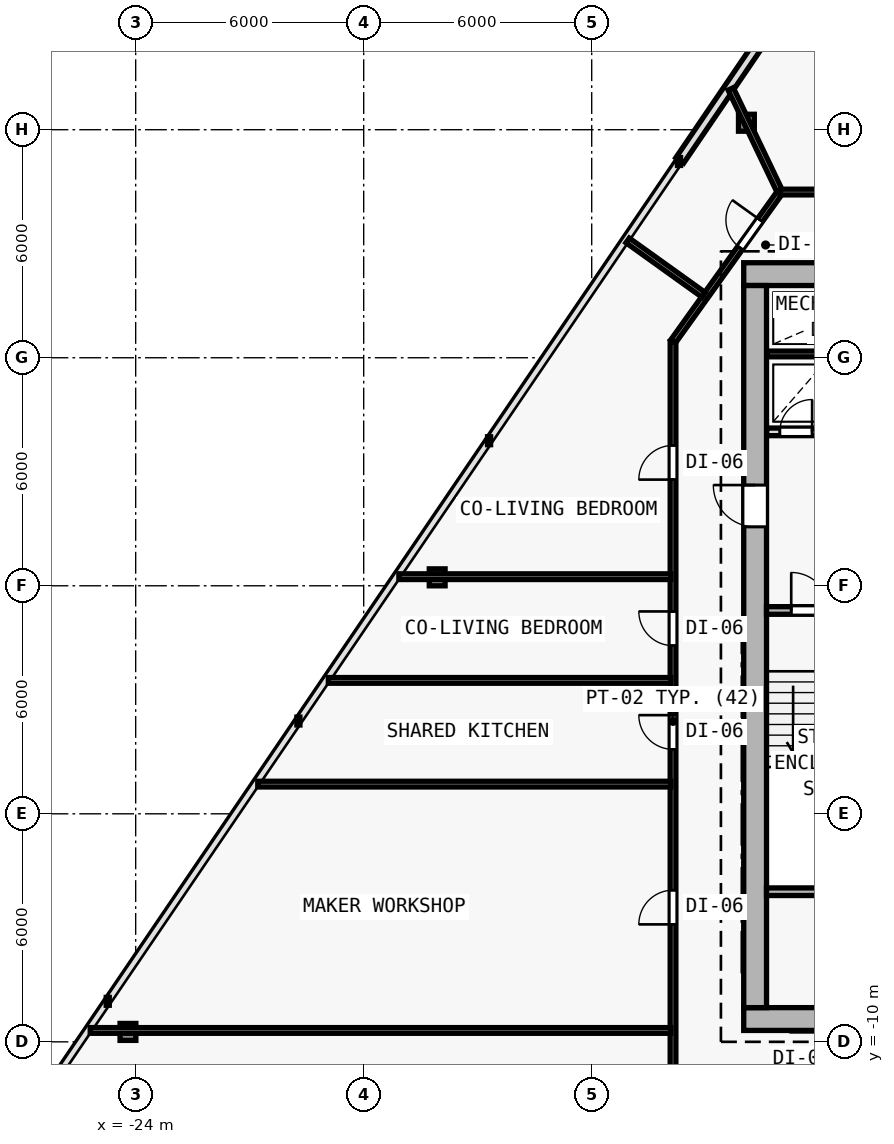
"""IFC4 building model, lengths in metres.
Left out: names, types, materials, properties, quantities, classifications, styles, units other than length and angle.
Written with IfcOpenShell. Run it as: python <this file> out.ifc"""

import sys

from ifc_helpers import new_model, si_unit, direction, frame, frame_2d, origin, origin_2d, place, context, subcontext, project, spatial, rectangle, i_section, extrude, element, fill, save


model = new_model("IFC4")
c1 = context("Model", 3, precision=1e-05, world=origin(), true_north=direction((0.0, 1.0)))
c2 = subcontext(c1, "Body", "Model", "MODEL_VIEW")
j1 = project(units=[si_unit("LENGTHUNIT", "METRE"), si_unit("PLANEANGLEUNIT", "RADIAN")], contexts=[c1])
p1 = place(None, origin())
s1 = spatial("IfcSite", under=j1, at=p1, CompositionType="ELEMENT")
p2 = place(p1, origin())
s2 = spatial("IfcBuilding", under=s1, at=p2, CompositionType="ELEMENT")
p3 = place(p2, frame((0.0, 0.0, 33.6)))
s3 = spatial("IfcBuildingStorey", under=s2, at=p3, CompositionType="ELEMENT", Elevation=33.6)
for number, where, z_axis, x_axis in (
    (1, (-7.7, -9.4, 0.0), (0.0, 0.0, 1.0), (1.0, 0.0, 0.0)),
    (2, (-7.7, 10.2, 0.0), (0.0, 0.0, 1.0), (1.0, 0.0, 0.0)),
    (3, (-7.7, 2.0, 0.0), (0.0, 0.0, 1.0), (1.0, 0.0, 0.0)),
):
    element("IfcColumn", number, at=place(p3, frame(where, z_axis=z_axis, x_axis=x_axis)), inside=s3, PredefinedType="COLUMN", context=c2, shape_type="SweptSolid", body=[
        extrude(i_section(OverallWidth=0.416, OverallDepth=0.446, WebThickness=0.025, FlangeThickness=0.04, FilletRadius=0.015, at=origin_2d()), origin(), (0.0, 0.0, 1.0), 3.6),
    ])
p4 = place(p3, frame((-7.929, 14.183, 0.005), z_axis=(0.008774547672, -0.002516730728, 0.999958335822), x_axis=(0.275705143097, 0.961242255662, 0.0)))
e4 = element("IfcColumn", 4, at=p4, inside=s3, PredefinedType="COLUMN", context=c2, shape_type="SweptSolid", body=[
    extrude(i_section(OverallWidth=0.416, OverallDepth=0.446, WebThickness=0.025, FlangeThickness=0.04, FilletRadius=0.015, at=origin_2d()), origin(), (0.0, 0.0, 1.0), 3.589),
])
p5 = place(p3, frame((-16.066, 2.222, 0.005), z_axis=(0.017070406608, 0.009521342331, 0.99980895438), x_axis=(-0.487119351792, 0.873335409284, 0.0)))
e5 = element("IfcColumn", 5, at=p5, inside=s3, PredefinedType="COLUMN", context=c2, shape_type="SweptSolid", body=[
    extrude(i_section(OverallWidth=0.416, OverallDepth=0.446, WebThickness=0.025, FlangeThickness=0.04, FilletRadius=0.015, at=origin_2d()), origin(), (0.0, 0.0, 1.0), 3.59),
])
p6 = place(p3, frame((-24.203, -9.739, 0.005), z_axis=(0.025222486673, 0.021551289152, 0.999449532544), x_axis=(-0.649609258817, 0.760268249278, 0.0)))
e6 = element("IfcColumn", 6, at=p6, inside=s3, PredefinedType="COLUMN", context=c2, shape_type="SweptSolid", body=[
    extrude(i_section(OverallWidth=0.416, OverallDepth=0.446, WebThickness=0.025, FlangeThickness=0.04, FilletRadius=0.015, at=origin_2d()), origin(), (0.0, 0.0, 1.0), 3.591),
])
p7 = place(p3, frame((-9.684, 13.191, 0.0), z_axis=(0.0, 0.0, 1.0), x_axis=(0.562473549685, 0.826815279192, 0.0)))
e7 = element("IfcWall", 7, at=p7, inside=s3, PredefinedType="SOLIDWALL", context=c2, shape_type="SweptSolid", body=[
    extrude(rectangle(XDim=12.536, YDim=0.25, at=frame_2d((6.268, 0.0))), origin(), (0.0, 0.0, 1.0), 3.35),
])
p8 = place(p7, frame((5.568, 0.0, 0.62)))
e8 = element("IfcOpeningElement", 8, at=p8, cuts=e7, PredefinedType="OPENING", context=c2, shape_type="SweptSolid", body=[
    extrude(rectangle(XDim=1.4, YDim=2.0, at=frame_2d((0.7, 1.0))), frame((0.0, 0.135, 0.0), z_axis=(0.0, -1.0, 0.0), x_axis=(1.0, 0.0, 0.0)), (0.0, 0.0, 1.0), 0.27),
])
p9 = place(p3, frame((-8.0, -9.4, 0.0), z_axis=(0.0, 0.0, 1.0), x_axis=(1.0, 0.0, 0.0)))
e9 = element("IfcWall", 9, at=p9, inside=s3, PredefinedType="SHEAR", context=c2, shape_type="SweptSolid", body=[
    extrude(rectangle(XDim=16.0, YDim=0.6, at=frame_2d((8.0, 0.0))), origin(), (0.0, 0.0, 1.0), 3.35),
])
p10 = place(p9, frame((9.65, 0.0, 0.0)))
e10 = element("IfcOpeningElement", 10, at=p10, cuts=e9, PredefinedType="OPENING", context=c2, shape_type="SweptSolid", body=[
    extrude(rectangle(XDim=1.5, YDim=2.2, at=frame_2d((0.75, 1.1))), frame((0.0, 0.31, 0.0), z_axis=(0.0, -1.0, 0.0), x_axis=(1.0, 0.0, 0.0)), (0.0, 0.0, 1.0), 0.62),
])
p11 = place(p3, frame((8.0, 10.2, 0.0), z_axis=(0.0, 0.0, 1.0), x_axis=(-1.0, 0.0, 0.0)))
e11 = element("IfcWall", 11, at=p11, inside=s3, PredefinedType="SHEAR", context=c2, shape_type="SweptSolid", body=[
    extrude(rectangle(XDim=16.0, YDim=0.6, at=frame_2d((8.0, 0.0))), origin(), (0.0, 0.0, 1.0), 3.35),
])
p12 = place(p11, frame((4.45, 0.0, 0.0)))
e12 = element("IfcOpeningElement", 12, at=p12, cuts=e11, PredefinedType="OPENING", context=c2, shape_type="SweptSolid", body=[
    extrude(rectangle(XDim=1.1, YDim=2.15, at=frame_2d((0.55, 1.075))), frame((0.0, 0.31, 0.0), z_axis=(0.0, -1.0, 0.0), x_axis=(1.0, 0.0, 0.0)), (0.0, 0.0, 1.0), 0.62),
])
p13 = place(p3, frame((-7.7, -9.1, 0.0), z_axis=(0.0, 0.0, 1.0), x_axis=(0.0, 1.0, 0.0)))
e13 = element("IfcWall", 13, at=p13, inside=s3, PredefinedType="SHEAR", context=c2, shape_type="SweptSolid", body=[
    extrude(rectangle(XDim=19.0, YDim=0.6, at=frame_2d((9.5, 0.0))), origin(), (0.0, 0.0, 1.0), 3.35),
])
p14 = place(p13, frame((12.65, 0.0, 0.0)))
e14 = element("IfcOpeningElement", 14, at=p14, cuts=e13, PredefinedType="OPENING", context=c2, shape_type="SweptSolid", body=[
    extrude(rectangle(XDim=1.1, YDim=2.15, at=frame_2d((0.55, 1.075))), frame((0.0, 0.31, 0.0), z_axis=(0.0, -1.0, 0.0), x_axis=(1.0, 0.0, 0.0)), (0.0, 0.0, 1.0), 0.62),
])
p15 = place(p3, frame((-7.4, 1.35, 0.0), z_axis=(0.0, 0.0, 1.0), x_axis=(1.0, 0.0, 0.0)))
e15 = element("IfcWall", 15, at=p15, inside=s3, PredefinedType="SOLIDWALL", context=c2, shape_type="SweptSolid", body=[
    extrude(rectangle(XDim=3.35, YDim=0.2, at=frame_2d((1.675, 0.0))), origin(), (0.0, 0.0, 1.0), 3.35),
])
p16 = place(p15, frame((0.65, 0.0, 0.0)))
e16 = element("IfcOpeningElement", 16, at=p16, cuts=e15, PredefinedType="OPENING", context=c2, shape_type="SweptSolid", body=[
    extrude(rectangle(XDim=1.0, YDim=2.15, at=frame_2d((0.5, 1.075))), frame((0.0, 0.11, 0.0), z_axis=(0.0, -1.0, 0.0), x_axis=(1.0, 0.0, 0.0)), (0.0, 0.0, 1.0), 0.22),
])
p17 = place(p3, frame((-7.395, 6.05, 0.0), z_axis=(0.0, 0.0, 1.0), x_axis=(1.0, 0.0, 0.0)))
e17 = element("IfcWall", 17, at=p17, inside=s3, PredefinedType="SOLIDWALL", context=c2, shape_type="SweptSolid", body=[
    extrude(rectangle(XDim=3.545, YDim=0.2, at=frame_2d((1.772, 0.0))), origin(), (0.0, 0.0, 1.0), 3.35),
])
p18 = place(p17, frame((0.345, 0.0, 0.0)))
e18 = element("IfcOpeningElement", 18, at=p18, cuts=e17, PredefinedType="OPENING", context=c2, shape_type="SweptSolid", body=[
    extrude(rectangle(XDim=0.85, YDim=2.1, at=frame_2d((0.425, 1.05))), frame((0.0, 0.11, 0.0), z_axis=(0.0, -1.0, 0.0), x_axis=(1.0, 0.0, 0.0)), (0.0, 0.0, 1.0), 0.22),
])
p19 = place(p17, frame((2.145, 0.0, 0.0)))
e19 = element("IfcOpeningElement", 19, at=p19, cuts=e17, PredefinedType="OPENING", context=c2, shape_type="SweptSolid", body=[
    extrude(rectangle(XDim=0.85, YDim=2.1, at=frame_2d((0.425, 1.05))), frame((0.0, 0.11, 0.0), z_axis=(0.0, -1.0, 0.0), x_axis=(1.0, 0.0, 0.0)), (0.0, 0.0, 1.0), 0.22),
])
p20 = place(p3, frame((-7.395, 8.1, 0.0), z_axis=(0.0, 0.0, 1.0), x_axis=(1.0, 0.0, 0.0)))
e20 = element("IfcWall", 20, at=p20, inside=s3, PredefinedType="PARTITIONING", context=c2, shape_type="SweptSolid", body=[
    extrude(rectangle(XDim=3.545, YDim=0.15, at=frame_2d((1.772, 0.0))), origin(), (0.0, 0.0, 1.0), 3.35),
])
p21 = place(p3, frame((-7.4, -6.05, 0.0), z_axis=(0.0, 0.0, 1.0), x_axis=(1.0, 0.0, 0.0)))
e21 = element("IfcWall", 21, at=p21, inside=s3, PredefinedType="SOLIDWALL", context=c2, shape_type="SweptSolid", body=[
    extrude(rectangle(XDim=3.35, YDim=0.2, at=frame_2d((1.675, 0.0))), origin(), (0.0, 0.0, 1.0), 3.35),
])
p22 = place(p3, frame((-9.86, -11.56, 0.0), z_axis=(0.0, 0.0, 1.0), x_axis=(0.0, 1.0, 0.0)))
e22 = element("IfcWall", 22, at=p22, inside=s3, PredefinedType="PARTITIONING", context=c2, shape_type="SweptSolid", body=[
    extrude(rectangle(XDim=19.986, YDim=0.15, at=frame_2d((9.993, 0.0))), origin(), (0.0, 0.0, 1.0), 2.609),
])
p23 = place(p22, frame((9.256, 0.0, 0.0)))
e23 = element("IfcOpeningElement", 23, at=p23, cuts=e22, PredefinedType="OPENING", context=c2, shape_type="SweptSolid", body=[
    extrude(rectangle(XDim=0.9, YDim=2.1, at=frame_2d((0.45, 1.05))), frame((0.0, 0.085, 0.0), z_axis=(0.0, -1.0, 0.0), x_axis=(1.0, 0.0, 0.0)), (0.0, 0.0, 1.0), 0.17),
])
p24 = place(p22, frame((4.65, 0.0, 0.0)))
e24 = element("IfcOpeningElement", 24, at=p24, cuts=e22, PredefinedType="OPENING", context=c2, shape_type="SweptSolid", body=[
    extrude(rectangle(XDim=0.9, YDim=2.1, at=frame_2d((0.45, 1.05))), frame((0.0, 0.085, 0.0), z_axis=(0.0, -1.0, 0.0), x_axis=(1.0, 0.0, 0.0)), (0.0, 0.0, 1.0), 0.17),
])
p25 = place(p22, frame((16.354, 0.0, 0.0)))
e25 = element("IfcOpeningElement", 25, at=p25, cuts=e22, PredefinedType="OPENING", context=c2, shape_type="SweptSolid", body=[
    extrude(rectangle(XDim=0.9, YDim=2.1, at=frame_2d((0.45, 1.05))), frame((0.0, 0.085, 0.0), z_axis=(0.0, -1.0, 0.0), x_axis=(1.0, 0.0, 0.0)), (0.0, 0.0, 1.0), 0.17),
])
p26 = place(p22, frame((11.985, 0.0, 0.0)))
e26 = element("IfcOpeningElement", 26, at=p26, cuts=e22, PredefinedType="OPENING", context=c2, shape_type="SweptSolid", body=[
    extrude(rectangle(XDim=0.9, YDim=2.1, at=frame_2d((0.45, 1.05))), frame((0.0, 0.085, 0.0), z_axis=(0.0, -1.0, 0.0), x_axis=(1.0, 0.0, 0.0)), (0.0, 0.0, 1.0), 0.17),
])
p27 = place(p3, frame((-9.86, 8.426, 0.0), z_axis=(0.0, 0.0, 1.0), x_axis=(0.582449511476, 0.812866881218, 0.0)))
e27 = element("IfcWall", 27, at=p27, inside=s3, PredefinedType="PARTITIONING", context=c2, shape_type="SweptSolid", body=[
    extrude(rectangle(XDim=4.84, YDim=0.15, at=frame_2d((2.42, 0.0))), origin(), (0.0, 0.0, 1.0), 2.725),
])
p28 = place(p27, frame((3.035, 0.0, 0.0)))
e28 = element("IfcOpeningElement", 28, at=p28, cuts=e27, PredefinedType="OPENING", context=c2, shape_type="SweptSolid", body=[
    extrude(rectangle(XDim=0.9, YDim=2.1, at=frame_2d((0.45, 1.05))), frame((0.0, 0.085, 0.0), z_axis=(0.0, -1.0, 0.0), x_axis=(1.0, 0.0, 0.0)), (0.0, 0.0, 1.0), 0.17),
])
p29 = place(p3, frame((-7.041, 12.36, 0.0), z_axis=(0.0, 0.0, 1.0), x_axis=(1.0, 0.0, 0.0)))
e29 = element("IfcWall", 29, at=p29, inside=s3, PredefinedType="PARTITIONING", context=c2, shape_type="SweptSolid", body=[
    extrude(rectangle(XDim=14.082, YDim=0.15, at=frame_2d((7.041, 0.0))), origin(), (0.0, 0.0, 1.0), 3.35),
])
p30 = place(p29, frame((10.257, 0.0, 0.0)))
e30 = element("IfcOpeningElement", 30, at=p30, cuts=e29, PredefinedType="OPENING", context=c2, shape_type="SweptSolid", body=[
    extrude(rectangle(XDim=0.9, YDim=2.1, at=frame_2d((0.45, 1.05))), frame((0.0, 0.085, 0.0), z_axis=(0.0, -1.0, 0.0), x_axis=(1.0, 0.0, 0.0)), (0.0, 0.0, 1.0), 0.17),
])
p31 = place(p29, frame((3.394, 0.0, 0.0)))
e31 = element("IfcOpeningElement", 31, at=p31, cuts=e29, PredefinedType="OPENING", context=c2, shape_type="SweptSolid", body=[
    extrude(rectangle(XDim=0.9, YDim=2.1, at=frame_2d((0.45, 1.05))), frame((0.0, 0.085, 0.0), z_axis=(0.0, -1.0, 0.0), x_axis=(1.0, 0.0, 0.0)), (0.0, 0.0, 1.0), 0.17),
])
p32 = place(p3, frame((-7.064, 12.404, 0.0), z_axis=(0.0, 0.0, 1.0), x_axis=(-0.431808559167, 0.901965281056, 0.0)))
e32 = element("IfcWall", 32, at=p32, inside=s3, PredefinedType="PARTITIONING", context=c2, shape_type="SweptSolid", body=[
    extrude(rectangle(XDim=2.96, YDim=0.15, at=frame_2d((1.48, 0.0))), origin(), (0.0, 0.0, 1.0), 2.725),
])
p33 = place(p3, frame((-9.92, 2.239, 0.0), z_axis=(0.0, 0.0, 1.0), x_axis=(-1.0, 0.0, 0.0)))
e33 = element("IfcWall", 33, at=p33, inside=s3, PredefinedType="PARTITIONING", context=c2, shape_type="SweptSolid", body=[
    extrude(rectangle(XDim=7.154, YDim=0.15, at=frame_2d((3.577, 0.0))), origin(), (0.0, 0.0, 1.0), 2.725),
])
p34 = place(p3, frame((-9.92, -9.7, 0.0), z_axis=(0.0, 0.0, 1.0), x_axis=(-1.0, 0.0, 0.0)))
e34 = element("IfcWall", 34, at=p34, inside=s3, PredefinedType="PARTITIONING", context=c2, shape_type="SweptSolid", body=[
    extrude(rectangle(XDim=15.276, YDim=0.15, at=frame_2d((7.638, 0.0))), origin(), (0.0, 0.0, 1.0), 2.609),
])
p35 = place(p3, frame((-9.92, -3.219, 0.0), z_axis=(0.0, 0.0, 1.0), x_axis=(-1.0, 0.0, 0.0)))
e35 = element("IfcWall", 35, at=p35, inside=s3, PredefinedType="PARTITIONING", context=c2, shape_type="SweptSolid", body=[
    extrude(rectangle(XDim=10.867, YDim=0.15, at=frame_2d((5.433, 0.0))), origin(), (0.0, 0.0, 1.0), 2.725),
])
p36 = place(p3, frame((-9.054, 9.654, 0.0), z_axis=(0.0, 0.0, 1.0), x_axis=(-0.812914965429, 0.582382399272, 0.0)))
e36 = element("IfcWall", 36, at=p36, inside=s3, PredefinedType="PARTITIONING", context=c2, shape_type="SweptSolid", body=[
    extrude(rectangle(XDim=2.461, YDim=0.15, at=frame_2d((1.23, 0.0))), origin(), (0.0, 0.0, 1.0), 2.735),
])
p37 = place(p3, frame((-9.92, -0.49, 0.0), z_axis=(0.0, 0.0, 1.0), x_axis=(-0.999999999633, 2.7095865e-05, 0.0)))
e37 = element("IfcWall", 37, at=p37, inside=s3, PredefinedType="PARTITIONING", context=c2, shape_type="SweptSolid", body=[
    extrude(rectangle(XDim=9.01, YDim=0.15, at=frame_2d((4.505, 0.0))), origin(), (0.0, 0.0, 1.0), 2.725),
])
p38 = place(p14, origin())
e38 = element("IfcDoor", 38, at=p38, inside=s3, OperationType="SINGLE_SWING_RIGHT", PredefinedType="DOOR", context=c2, shape_type="SweptSolid", body=[
    extrude(rectangle(XDim=1.1, YDim=2.15, at=frame_2d((0.55, 1.075))), frame((0.0, 0.025, 0.0), z_axis=(0.0, -1.0, 0.0), x_axis=(1.0, 0.0, 0.0)), (0.0, 0.0, 1.0), 0.05),
])
fill(e14, e38)
p39 = place(p16, origin())
e39 = element("IfcDoor", 39, at=p39, inside=s3, OperationType="SINGLE_SWING_LEFT", PredefinedType="DOOR", context=c2, shape_type="SweptSolid", body=[
    extrude(rectangle(XDim=1.0, YDim=2.15, at=frame_2d((0.5, 1.075))), frame((0.0, 0.025, 0.0), z_axis=(0.0, -1.0, 0.0), x_axis=(1.0, 0.0, 0.0)), (0.0, 0.0, 1.0), 0.05),
])
fill(e16, e39)
p40 = place(p18, origin())
e40 = element("IfcDoor", 40, at=p40, inside=s3, OperationType="SINGLE_SWING_RIGHT", PredefinedType="DOOR", context=c2, shape_type="SweptSolid", body=[
    extrude(rectangle(XDim=0.85, YDim=2.1, at=frame_2d((0.425, 1.05))), frame((0.0, 0.025, 0.0), z_axis=(0.0, -1.0, 0.0), x_axis=(1.0, 0.0, 0.0)), (0.0, 0.0, 1.0), 0.05),
])
fill(e18, e40)
p41 = place(p23, origin())
e41 = element("IfcDoor", 41, at=p41, inside=s3, OperationType="SINGLE_SWING_RIGHT", PredefinedType="DOOR", context=c2, shape_type="SweptSolid", body=[
    extrude(rectangle(XDim=0.9, YDim=2.1, at=frame_2d((0.45, 1.05))), frame((0.0, 0.025, 0.0), z_axis=(0.0, -1.0, 0.0), x_axis=(1.0, 0.0, 0.0)), (0.0, 0.0, 1.0), 0.05),
])
fill(e23, e41)
p42 = place(p24, origin())
e42 = element("IfcDoor", 42, at=p42, inside=s3, OperationType="SINGLE_SWING_LEFT", PredefinedType="DOOR", context=c2, shape_type="SweptSolid", body=[
    extrude(rectangle(XDim=0.9, YDim=2.1, at=frame_2d((0.45, 1.05))), frame((0.0, 0.025, 0.0), z_axis=(0.0, -1.0, 0.0), x_axis=(1.0, 0.0, 0.0)), (0.0, 0.0, 1.0), 0.05),
])
fill(e24, e42)
p43 = place(p28, origin())
e43 = element("IfcDoor", 43, at=p43, inside=s3, OperationType="SINGLE_SWING_RIGHT", PredefinedType="DOOR", context=c2, shape_type="SweptSolid", body=[
    extrude(rectangle(XDim=0.9, YDim=2.1, at=frame_2d((0.45, 1.05))), frame((0.0, 0.025, 0.0), z_axis=(0.0, -1.0, 0.0), x_axis=(1.0, 0.0, 0.0)), (0.0, 0.0, 1.0), 0.05),
])
fill(e28, e43)
p44 = place(p25, origin())
e44 = element("IfcDoor", 44, at=p44, inside=s3, OperationType="SINGLE_SWING_LEFT", PredefinedType="DOOR", context=c2, shape_type="SweptSolid", body=[
    extrude(rectangle(XDim=0.9, YDim=2.1, at=frame_2d((0.45, 1.05))), frame((0.0, 0.025, 0.0), z_axis=(0.0, -1.0, 0.0), x_axis=(1.0, 0.0, 0.0)), (0.0, 0.0, 1.0), 0.05),
])
fill(e25, e44)
p45 = place(p26, origin())
e45 = element("IfcDoor", 45, at=p45, inside=s3, OperationType="SINGLE_SWING_RIGHT", PredefinedType="DOOR", context=c2, shape_type="SweptSolid", body=[
    extrude(rectangle(XDim=0.9, YDim=2.1, at=frame_2d((0.45, 1.05))), frame((0.0, 0.025, 0.0), z_axis=(0.0, -1.0, 0.0), x_axis=(1.0, 0.0, 0.0)), (0.0, 0.0, 1.0), 0.05),
])
fill(e26, e45)
save(model, sys.argv[1])
